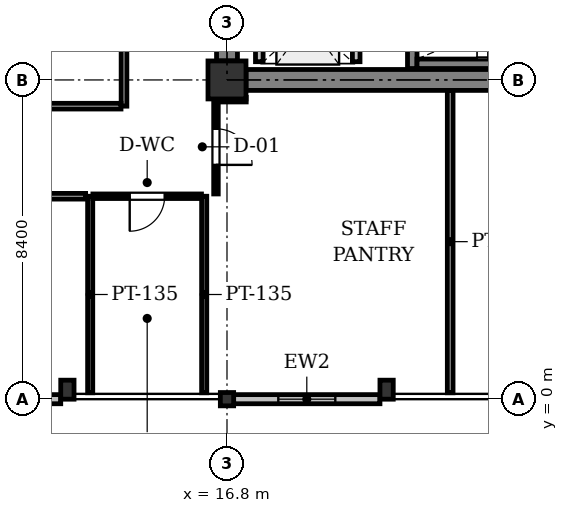
"""IFC4 building model, lengths in metres.
Left out: names, types, materials, properties, quantities, classifications, styles, units other than length and angle.
Written with IfcOpenShell. Run it as: python <this file> out.ifc"""

import sys

from ifc_helpers import new_model, si_unit, direction, frame, frame_2d, origin, origin_2d, place, context, subcontext, project, spatial, rectangle, i_section, extrude, element, fill, save


model = new_model("IFC4")
c1 = context("Model", 3, precision=1e-05, world=origin(), true_north=direction((0.0, 1.0)))
c2 = subcontext(c1, "Body", "Model", "MODEL_VIEW")
j1 = project(units=[si_unit("LENGTHUNIT", "METRE"), si_unit("PLANEANGLEUNIT", "RADIAN")], contexts=[c1])
p1 = place(None, origin())
s1 = spatial("IfcSite", under=j1, at=p1, CompositionType="ELEMENT")
p2 = place(p1, origin())
s2 = spatial("IfcBuilding", under=s1, at=p2, CompositionType="ELEMENT")
p3 = place(p2, frame((0.0, 0.0, 208.3)))
s3 = spatial("IfcBuildingStorey", under=s2, at=p3, CompositionType="ELEMENT", Elevation=208.3)
p4 = place(p3, frame((16.8, 0.0, 0.0), z_axis=(0.0, 0.0, 1.0), x_axis=(1.0, 0.0, 0.0)))
e1 = element("IfcColumn", 1, at=p4, inside=s3, PredefinedType="COLUMN", context=c2, shape_type="SweptSolid", body=[
    extrude(i_section(OverallWidth=0.35, OverallDepth=0.35, WebThickness=0.02, FlangeThickness=0.032, at=origin_2d()), origin(), (0.0, 0.0, 1.0), 4.1),
])
p5 = place(p3, frame((16.8, 8.4, 0.0), z_axis=(0.0, 0.0, 1.0), x_axis=(1.0, 0.0, 0.0)))
e2 = element("IfcColumn", 2, at=p5, inside=s3, PredefinedType="COLUMN", context=c2, shape_type="SweptSolid", body=[
    extrude(rectangle(XDim=1.0, YDim=1.0, at=origin_2d()), origin(), (0.0, 0.0, 1.0), 4.1),
])
for number, where, z_axis, x_axis in (
    (3, (12.6, 0.25, 0.0), (0.0, 0.0, 1.0), (1.0, 0.0, 0.0)),
    (4, (21.0, 0.25, 0.0), (0.0, 0.0, 1.0), (1.0, 0.0, 0.0)),
):
    element("IfcColumn", number, at=place(p3, frame(where, z_axis=z_axis, x_axis=x_axis)), inside=s3, PredefinedType="PILASTER", context=c2, shape_type="SweptSolid", body=[
        extrude(rectangle(XDim=0.35, YDim=0.5, at=origin_2d()), origin(), (0.0, 0.0, 1.0), 4.1),
    ])
p6 = place(p3, frame((20.825, 0.0, 0.0), z_axis=(0.0, 0.0, 1.0), x_axis=(-1.0, 0.0, 0.0)))
e5 = element("IfcWall", 5, at=p6, inside=s3, PredefinedType="STANDARD", context=c2, shape_type="SweptSolid", body=[
    extrude(rectangle(XDim=3.85, YDim=0.24, at=frame_2d((1.925, 0.0))), origin(), (0.0, 0.0, 1.0), 3.525),
])
p7 = place(p6, frame((1.175, 0.0, 0.9)))
e6 = element("IfcOpeningElement", 6, at=p7, cuts=e5, PredefinedType="OPENING", context=c2, shape_type="SweptSolid", body=[
    extrude(rectangle(XDim=1.5, YDim=1.6, at=frame_2d((0.75, 0.8))), frame((0.0, 0.13, 0.0), z_axis=(0.0, -1.0, 0.0), x_axis=(1.0, 0.0, 0.0)), (0.0, 0.0, 1.0), 0.26),
])
p8 = place(p3, frame((12.425, 0.0, 0.0), z_axis=(0.0, 0.0, 1.0), x_axis=(-1.0, 0.0, 0.0)))
e7 = element("IfcWall", 7, at=p8, inside=s3, PredefinedType="STANDARD", context=c2, shape_type="SweptSolid", body=[
    extrude(rectangle(XDim=3.85, YDim=0.24, at=frame_2d((1.925, 0.0))), origin(), (0.0, 0.0, 1.0), 3.525),
])
p9 = place(p8, frame((1.175, 0.0, 0.9)))
e8 = element("IfcOpeningElement", 8, at=p9, cuts=e7, PredefinedType="OPENING", context=c2, shape_type="SweptSolid", body=[
    extrude(rectangle(XDim=1.5, YDim=1.6, at=frame_2d((0.75, 0.8))), frame((0.0, 0.13, 0.0), z_axis=(0.0, -1.0, 0.0), x_axis=(1.0, 0.0, 0.0)), (0.0, 0.0, 1.0), 0.26),
])
p10 = place(p3, frame((17.3, 8.4, 0.0), z_axis=(0.0, 0.0, 1.0), x_axis=(1.0, 0.0, 0.0)))
e9 = element("IfcWall", 9, at=p10, inside=s3, PredefinedType="SHEAR", context=c2, shape_type="SweptSolid", body=[
    extrude(rectangle(XDim=7.4, YDim=0.55, at=frame_2d((3.7, 0.0))), origin(), (0.0, 0.0, 1.0), 3.825),
])
p11 = place(p3, frame((16.8, 8.9, 0.0), z_axis=(0.0, 0.0, 1.0), x_axis=(0.0, 1.0, 0.0)))
e10 = element("IfcWall", 10, at=p11, inside=s3, PredefinedType="SHEAR", context=c2, shape_type="SweptSolid", body=[
    extrude(rectangle(XDim=7.4, YDim=0.55, at=frame_2d((3.7, 0.0))), origin(), (0.0, 0.0, 1.0), 3.825),
])
p12 = place(p11, frame((3.35, 0.0, 0.0)))
e11 = element("IfcOpeningElement", 11, at=p12, cuts=e10, PredefinedType="OPENING", context=c2, shape_type="SweptSolid", body=[
    extrude(rectangle(XDim=1.1, YDim=2.15, at=frame_2d((0.55, 1.075))), frame((0.0, 0.285, 0.0), z_axis=(0.0, -1.0, 0.0), x_axis=(1.0, 0.0, 0.0)), (0.0, 0.0, 1.0), 0.57),
])
p13 = place(p3, frame((21.675, 8.7, 0.0), z_axis=(0.0, 0.0, 1.0), x_axis=(0.0, 1.0, 0.0)))
e12 = element("IfcWall", 12, at=p13, inside=s3, PredefinedType="SHEAR", context=c2, shape_type="SweptSolid", body=[
    extrude(rectangle(XDim=3.75, YDim=0.25, at=frame_2d((1.875, 0.0))), origin(), (0.0, 0.0, 1.0), 3.825),
])
p14 = place(p3, frame((21.8, 8.825, 0.0), z_axis=(0.0, 0.0, 1.0), x_axis=(1.0, 0.0, 0.0)))
e13 = element("IfcWall", 13, at=p14, inside=s3, PredefinedType="SHEAR", context=c2, shape_type="SweptSolid", body=[
    extrude(rectangle(XDim=7.75, YDim=0.25, at=frame_2d((3.875, 0.0))), origin(), (0.0, 0.0, 1.0), 3.825),
])
for number, where, z_axis, x_axis in (
    (14, (20.2, 8.88, 0.0), (0.0, 0.0, 1.0), (0.0, 1.0, 0.0)),
    (15, (17.65, 8.88, 0.0), (0.0, 0.0, 1.0), (0.0, 1.0, 0.0)),
):
    element("IfcWall", number, at=place(p3, frame(where, z_axis=z_axis, x_axis=x_axis)), inside=s3, PredefinedType="PARTITIONING", context=c2, shape_type="SweptSolid", body=[
        extrude(rectangle(XDim=2.1, YDim=0.2, at=frame_2d((1.05, 0.0))), origin(), (0.0, 0.0, 1.0), 3.825),
    ])
for number, where, z_axis, x_axis in (
    (16, (13.2, 5.34, 0.0), (0.0, 0.0, 1.0), (0.0, -1.0, 0.0)),
    (17, (16.2, 0.169, 0.0), (0.0, 0.0, 1.0), (0.0, 1.0, 0.0)),
):
    element("IfcWall", number, at=place(p3, frame(where, z_axis=z_axis, x_axis=x_axis)), inside=s3, PredefinedType="PARTITIONING", context=c2, shape_type="SweptSolid", body=[
        extrude(rectangle(XDim=5.171, YDim=0.135, at=frame_2d((2.585, 0.0))), origin(), (0.0, 0.0, 1.0), 3.825),
    ])
p15 = place(p3, frame((16.128, 5.34, 0.0), z_axis=(0.0, 0.0, 1.0), x_axis=(-1.0, 0.0, 0.0)))
e18 = element("IfcWall", 18, at=p15, inside=s3, PredefinedType="PARTITIONING", context=c2, shape_type="SweptSolid", body=[
    extrude(rectangle(XDim=2.857, YDim=0.12, at=frame_2d((1.428, 0.0))), origin(), (0.0, 0.0, 1.0), 3.825),
])
p16 = place(p15, frame((0.969, 0.0, 0.0)))
e19 = element("IfcOpeningElement", 19, at=p16, cuts=e18, PredefinedType="OPENING", context=c2, shape_type="SweptSolid", body=[
    extrude(rectangle(XDim=0.92, YDim=2.1, at=frame_2d((0.46, 1.05))), frame((0.0, 0.07, 0.0), z_axis=(0.0, -1.0, 0.0), x_axis=(1.0, 0.0, 0.0)), (0.0, 0.0, 1.0), 0.14),
])
p17 = place(p3, frame((22.673, 0.169, 0.0), z_axis=(0.0, 0.0, 1.0), x_axis=(0.0, 1.0, 0.0)))
e20 = element("IfcWall", 20, at=p17, inside=s3, PredefinedType="PARTITIONING", context=c2, shape_type="SweptSolid", body=[
    extrude(rectangle(XDim=7.952, YDim=0.15, at=frame_2d((3.976, 0.0))), origin(), (0.0, 0.0, 1.0), 3.825),
])
p18 = place(p3, frame((17.306, 7.881, 0.0), z_axis=(0.0, 0.0, 1.0), x_axis=(-0.999999247244, -0.001226992941, 0.0)))
e21 = element("IfcWall", 21, at=p18, inside=s3, PredefinedType="PARTITIONING", context=c2, shape_type="SweptSolid", body=[
    extrude(rectangle(XDim=0.796, YDim=0.12, at=frame_2d((0.398, 0.0))), origin(), (0.0, 0.0, 1.0), 3.371),
])
p19 = place(p3, frame((16.51, 7.88, 0.0), z_axis=(0.0, 0.0, 1.0), x_axis=(0.0, -1.0, 0.0)))
e22 = element("IfcWall", 22, at=p19, inside=s3, PredefinedType="PARTITIONING", context=c2, shape_type="SweptSolid", body=[
    extrude(rectangle(XDim=2.48, YDim=0.12, at=frame_2d((1.24, 0.0))), origin(), (0.0, 0.0, 1.0), 3.825),
])
p20 = place(p19, frame((0.765, 0.0, 0.0)))
e23 = element("IfcOpeningElement", 23, at=p20, cuts=e22, PredefinedType="OPENING", context=c2, shape_type="SweptSolid", body=[
    extrude(rectangle(XDim=0.95, YDim=2.15, at=frame_2d((0.475, 1.075))), frame((0.0, 0.07, 0.0), z_axis=(0.0, -1.0, 0.0), x_axis=(1.0, 0.0, 0.0)), (0.0, 0.0, 1.0), 0.14),
])
p21 = place(p3, frame((14.09, 7.71, 0.0), z_axis=(0.0, 0.0, 1.0), x_axis=(0.0, 1.0, 0.0)))
e24 = element("IfcWall", 24, at=p21, inside=s3, PredefinedType="PARTITIONING", context=c2, shape_type="SweptSolid", body=[
    extrude(rectangle(XDim=9.83, YDim=0.15, at=frame_2d((4.915, 0.0))), origin(), (0.0, 0.0, 1.0), 3.365),
])
p22 = place(p21, frame((4.44, 0.0, 0.0)))
e25 = element("IfcOpeningElement", 25, at=p22, cuts=e24, PredefinedType="OPENING", context=c2, shape_type="SweptSolid", body=[
    extrude(rectangle(XDim=0.95, YDim=2.15, at=frame_2d((0.475, 1.075))), frame((0.0, 0.085, 0.0), z_axis=(0.0, -1.0, 0.0), x_axis=(1.0, 0.0, 0.0)), (0.0, 0.0, 1.0), 0.17),
])
p23 = place(p3, frame((7.789, 7.71, 0.0), z_axis=(0.0, 0.0, 1.0), x_axis=(1.0, 0.0, 0.0)))
e26 = element("IfcWall", 26, at=p23, inside=s3, PredefinedType="PARTITIONING", context=c2, shape_type="SweptSolid", body=[
    extrude(rectangle(XDim=6.222, YDim=0.15, at=frame_2d((3.111, 0.0))), origin(), (0.0, 0.0, 1.0), 3.371),
])
p24 = place(p3, frame((13.08, 5.34, 0.0), z_axis=(0.0, 0.0, 1.0), x_axis=(-1.0, 0.0, 0.0)))
e27 = element("IfcWall", 27, at=p24, inside=s3, PredefinedType="PARTITIONING", context=c2, shape_type="SweptSolid", body=[
    extrude(rectangle(XDim=7.68, YDim=0.15, at=frame_2d((3.84, 0.0))), origin(), (0.0, 0.0, 1.0), 3.371),
])
p25 = place(p7, origin())
e28 = element("IfcWindow", 28, at=p25, inside=s3, PartitioningType="SINGLE_PANEL", PredefinedType="WINDOW", context=c2, shape_type="SweptSolid", body=[
    extrude(rectangle(XDim=1.5, YDim=1.6, at=frame_2d((0.75, 0.8))), frame((0.0, 0.03, 0.0), z_axis=(0.0, -1.0, 0.0), x_axis=(1.0, 0.0, 0.0)), (0.0, 0.0, 1.0), 0.06),
])
fill(e6, e28)
p26 = place(p16, origin())
e29 = element("IfcDoor", 29, at=p26, inside=s3, OperationType="SINGLE_SWING_RIGHT", PredefinedType="DOOR", context=c2, shape_type="SweptSolid", body=[
    extrude(rectangle(XDim=0.92, YDim=2.1, at=frame_2d((0.46, 1.05))), frame((0.0, 0.025, 0.0), z_axis=(0.0, -1.0, 0.0), x_axis=(1.0, 0.0, 0.0)), (0.0, 0.0, 1.0), 0.05),
])
fill(e19, e29)
p27 = place(p20, origin())
e30 = element("IfcDoor", 30, at=p27, inside=s3, OperationType="SINGLE_SWING_RIGHT", PredefinedType="DOOR", context=c2, shape_type="SweptSolid", body=[
    extrude(rectangle(XDim=0.95, YDim=2.15, at=frame_2d((0.475, 1.075))), frame((0.0, 0.025, 0.0), z_axis=(0.0, -1.0, 0.0), x_axis=(1.0, 0.0, 0.0)), (0.0, 0.0, 1.0), 0.05),
])
fill(e23, e30)
save(model, sys.argv[1])
